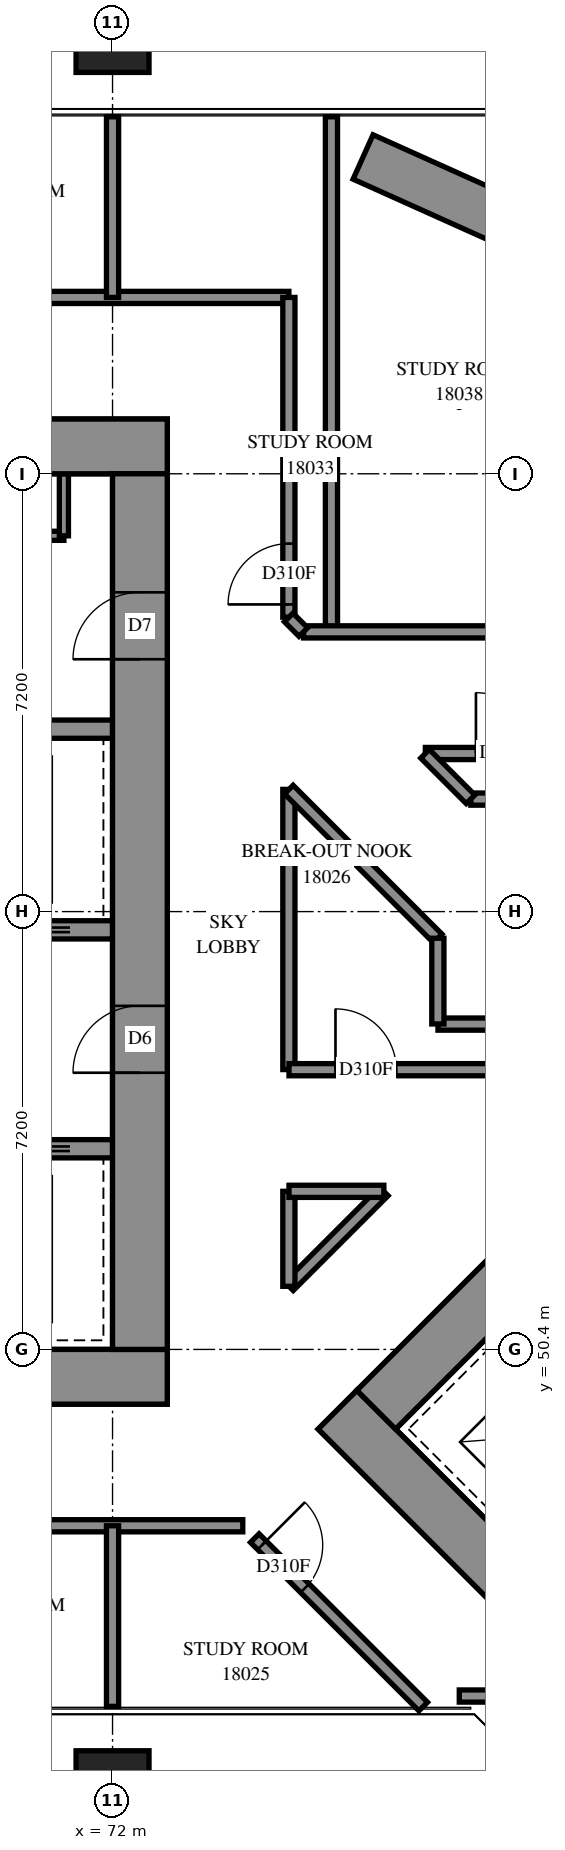
"""IFC4 building model, lengths in metres.
Left out: names, types, materials, properties, quantities, classifications, styles, units other than length and angle.
Written with IfcOpenShell. Run it as: python <this file> out.ifc"""

import sys

from ifc_helpers import new_model, si_unit, direction, frame, frame_2d, origin, origin_2d, place, context, subcontext, project, spatial, rectangle, extrude, element, fill, save


model = new_model("IFC4")
c1 = context("Model", 3, precision=1e-05, world=origin(), true_north=direction((0.0, 1.0)))
c2 = subcontext(c1, "Body", "Model", "MODEL_VIEW")
j1 = project(units=[si_unit("LENGTHUNIT", "METRE"), si_unit("PLANEANGLEUNIT", "RADIAN")], contexts=[c1])
p1 = place(None, origin())
s1 = spatial("IfcSite", under=j1, at=p1, CompositionType="ELEMENT")
p2 = place(p1, origin())
s2 = spatial("IfcBuilding", under=s1, at=p2, CompositionType="ELEMENT")
p3 = place(p2, frame((0.0, 0.0, 67.8)))
s3 = spatial("IfcBuildingStorey", under=s2, at=p3, CompositionType="ELEMENT", Elevation=67.8)
for number, where, z_axis, x_axis in (
    (1, (72.0, 43.2, 0.0), (0.0, 0.0, 1.0), (1.0, 0.0, 0.0)),
    (2, (72.0, 72.0, 0.0), (0.0, 0.0, 1.0), (1.0, 0.0, 0.0)),
):
    element("IfcColumn", number, at=place(p3, frame(where, z_axis=z_axis, x_axis=x_axis)), inside=s3, PredefinedType="COLUMN", context=c2, shape_type="SweptSolid", body=[
        extrude(rectangle(XDim=1.2, YDim=1.2, at=origin_2d()), origin(), (0.0, 0.0, 1.0), 3.9),
    ])
p4 = place(p3, frame((56.7, 49.95, -0.3), z_axis=(0.0, 0.0, 1.0), x_axis=(1.0, 0.0, 0.0)))
e3 = element("IfcWall", 3, at=p4, inside=s3, PredefinedType="SHEAR", context=c2, shape_type="SweptSolid", body=[
    extrude(rectangle(XDim=16.2, YDim=0.9, at=frame_2d((8.1, 0.0))), origin(), (0.0, 0.0, 1.0), 3.5),
])
p5 = place(p3, frame((56.7, 65.25, -0.3), z_axis=(0.0, 0.0, 1.0), x_axis=(1.0, 0.0, 0.0)))
e4 = element("IfcWall", 4, at=p5, inside=s3, PredefinedType="SHEAR", context=c2, shape_type="SweptSolid", body=[
    extrude(rectangle(XDim=16.2, YDim=0.9, at=frame_2d((8.1, 0.0))), origin(), (0.0, 0.0, 1.0), 3.5),
])
p6 = place(p5, frame((10.9, 0.0, 0.3)))
e5 = element("IfcOpeningElement", 5, at=p6, cuts=e4, PredefinedType="OPENING", context=c2, shape_type="SweptSolid", body=[
    extrude(rectangle(XDim=0.8, YDim=2.1, at=frame_2d((0.4, 1.05))), frame((0.0, 0.46, 0.0), z_axis=(0.0, -1.0, 0.0), x_axis=(1.0, 0.0, 0.0)), (0.0, 0.0, 1.0), 0.92),
])
p7 = place(p3, frame((72.45, 50.4, -0.3), z_axis=(0.0, 0.0, 1.0), x_axis=(0.0, 1.0, 0.0)))
e6 = element("IfcWall", 6, at=p7, inside=s3, PredefinedType="SHEAR", context=c2, shape_type="SweptSolid", body=[
    extrude(rectangle(XDim=14.4, YDim=0.9, at=frame_2d((7.2, 0.0))), origin(), (0.0, 0.0, 1.0), 3.5),
])
p8 = place(p7, frame((4.55, 0.0, 0.3)))
e7 = element("IfcOpeningElement", 7, at=p8, cuts=e6, PredefinedType="OPENING", context=c2, shape_type="SweptSolid", body=[
    extrude(rectangle(XDim=1.1, YDim=2.1, at=frame_2d((0.55, 1.05))), frame((0.0, 0.46, 0.0), z_axis=(0.0, -1.0, 0.0), x_axis=(1.0, 0.0, 0.0)), (0.0, 0.0, 1.0), 0.92),
])
p9 = place(p7, frame((11.35, 0.0, 0.3)))
e8 = element("IfcOpeningElement", 8, at=p9, cuts=e6, PredefinedType="OPENING", context=c2, shape_type="SweptSolid", body=[
    extrude(rectangle(XDim=1.1, YDim=2.1, at=frame_2d((0.55, 1.05))), frame((0.0, 0.46, 0.0), z_axis=(0.0, -1.0, 0.0), x_axis=(1.0, 0.0, 0.0)), (0.0, 0.0, 1.0), 0.92),
])
p10 = place(p3, frame((57.6, 53.7, 0.0), z_axis=(0.0, 0.0, 1.0), x_axis=(1.0, 0.0, 0.0)))
e9 = element("IfcWall", 9, at=p10, inside=s3, PredefinedType="SOLIDWALL", context=c2, shape_type="SweptSolid", body=[
    extrude(rectangle(XDim=14.4, YDim=0.3, at=frame_2d((7.2, 0.0))), origin(), (0.0, 0.0, 1.0), 3.9),
])
p11 = place(p10, frame((1.25, 0.0, 0.0)))
e10 = element("IfcOpeningElement", 10, at=p11, cuts=e9, PredefinedType="OPENING", context=c2, shape_type="SweptSolid", body=[
    extrude(rectangle(XDim=1.1, YDim=2.1, at=frame_2d((0.55, 1.05))), frame((0.0, 0.16, 0.0), z_axis=(0.0, -1.0, 0.0), x_axis=(1.0, 0.0, 0.0)), (0.0, 0.0, 1.0), 0.32),
])
p12 = place(p10, frame((4.85, 0.0, 0.0)))
e11 = element("IfcOpeningElement", 11, at=p12, cuts=e9, PredefinedType="OPENING", context=c2, shape_type="SweptSolid", body=[
    extrude(rectangle(XDim=1.1, YDim=2.1, at=frame_2d((0.55, 1.05))), frame((0.0, 0.16, 0.0), z_axis=(0.0, -1.0, 0.0), x_axis=(1.0, 0.0, 0.0)), (0.0, 0.0, 1.0), 0.32),
])
p13 = place(p10, frame((8.45, 0.0, 0.0)))
e12 = element("IfcOpeningElement", 12, at=p13, cuts=e9, PredefinedType="OPENING", context=c2, shape_type="SweptSolid", body=[
    extrude(rectangle(XDim=1.1, YDim=2.1, at=frame_2d((0.55, 1.05))), frame((0.0, 0.16, 0.0), z_axis=(0.0, -1.0, 0.0), x_axis=(1.0, 0.0, 0.0)), (0.0, 0.0, 1.0), 0.32),
])
p14 = place(p10, frame((12.05, 0.0, 0.0)))
e13 = element("IfcOpeningElement", 13, at=p14, cuts=e9, PredefinedType="OPENING", context=c2, shape_type="SweptSolid", body=[
    extrude(rectangle(XDim=1.1, YDim=2.1, at=frame_2d((0.55, 1.05))), frame((0.0, 0.16, 0.0), z_axis=(0.0, -1.0, 0.0), x_axis=(1.0, 0.0, 0.0)), (0.0, 0.0, 1.0), 0.32),
])
p15 = place(p3, frame((57.6, 57.3, 0.0), z_axis=(0.0, 0.0, 1.0), x_axis=(1.0, 0.0, 0.0)))
e14 = element("IfcWall", 14, at=p15, inside=s3, PredefinedType="SOLIDWALL", context=c2, shape_type="SweptSolid", body=[
    extrude(rectangle(XDim=14.4, YDim=0.3, at=frame_2d((7.2, 0.0))), origin(), (0.0, 0.0, 1.0), 3.9),
])
p16 = place(p15, frame((12.05, 0.0, 0.0)))
e15 = element("IfcOpeningElement", 15, at=p16, cuts=e14, PredefinedType="OPENING", context=c2, shape_type="SweptSolid", body=[
    extrude(rectangle(XDim=1.1, YDim=2.1, at=frame_2d((0.55, 1.05))), frame((0.0, 0.16, 0.0), z_axis=(0.0, -1.0, 0.0), x_axis=(1.0, 0.0, 0.0)), (0.0, 0.0, 1.0), 0.32),
])
p17 = place(p3, frame((64.8, 60.6, 0.0), z_axis=(0.0, 0.0, 1.0), x_axis=(1.0, 0.0, 0.0)))
e16 = element("IfcWall", 16, at=p17, inside=s3, PredefinedType="SOLIDWALL", context=c2, shape_type="SweptSolid", body=[
    extrude(rectangle(XDim=7.2, YDim=0.3, at=frame_2d((3.6, 0.0))), origin(), (0.0, 0.0, 1.0), 3.9),
])
p18 = place(p3, frame((75.7, 49.408, -0.3), z_axis=(0.0, 0.0, 1.0), x_axis=(0.7071098676, -0.7071036948, 0.0)))
e17 = element("IfcWall", 17, at=p18, inside=s3, PredefinedType="SHEAR", context=c2, shape_type="SweptSolid", body=[
    extrude(rectangle(XDim=16.2, YDim=0.9, at=frame_2d((8.1, 0.0))), origin(), (0.0, 0.0, 1.0), 3.5),
])
p19 = place(p3, frame((76.336, 49.408, -0.3), z_axis=(0.0, 0.0, 1.0), x_axis=(0.7071067812, 0.7071067812, 0.0)))
e18 = element("IfcWall", 18, at=p19, inside=s3, PredefinedType="SHEAR", context=c2, shape_type="SweptSolid", body=[
    extrude(rectangle(XDim=14.4, YDim=0.9, at=frame_2d((7.2, 0.0))), origin(), (0.0, 0.0, 1.0), 3.5),
])
p20 = place(p19, frame((4.55, 0.0, 0.3)))
e19 = element("IfcOpeningElement", 19, at=p20, cuts=e18, PredefinedType="OPENING", context=c2, shape_type="SweptSolid", body=[
    extrude(rectangle(XDim=1.1, YDim=2.1, at=frame_2d((0.55, 1.05))), frame((0.0, 0.46, 0.0), z_axis=(0.0, -1.0, 0.0), x_axis=(1.0, 0.0, 0.0)), (0.0, 0.0, 1.0), 0.92),
])
p21 = place(p19, frame((11.35, 0.0, 0.3)))
e20 = element("IfcOpeningElement", 20, at=p21, cuts=e18, PredefinedType="OPENING", context=c2, shape_type="SweptSolid", body=[
    extrude(rectangle(XDim=1.1, YDim=2.1, at=frame_2d((0.55, 1.05))), frame((0.0, 0.46, 0.0), z_axis=(0.0, -1.0, 0.0), x_axis=(1.0, 0.0, 0.0)), (0.0, 0.0, 1.0), 0.92),
])
p22 = place(p3, frame((79.28, 68.59, 0.0), z_axis=(0.0, 0.0, 1.0), x_axis=(-0.9121050399, 0.4099565785, 0.0)))
e21 = element("IfcWall", 21, at=p22, inside=s3, PredefinedType="SOLIDWALL", context=c2, shape_type="SweptSolid", body=[
    extrude(rectangle(XDim=3.465, YDim=0.8, at=frame_2d((1.732, 0.0))), origin(), (0.0, 0.0, 1.0), 0.65),
])
p23 = place(p3, frame((64.95, 63.78, 0.0), z_axis=(0.0, 0.0, 1.0), x_axis=(1.0, 0.0, 0.0)))
e22 = element("IfcWall", 22, at=p23, inside=s3, PredefinedType="PARTITIONING", context=c2, shape_type="SweptSolid", body=[
    extrude(rectangle(XDim=6.25, YDim=0.15, at=frame_2d((3.125, 0.0))), origin(), (0.0, 0.0, 1.0), 3.9),
])
p24 = place(p3, frame((71.2, 63.78, 0.0), z_axis=(0.0, 0.0, 1.0), x_axis=(0.0, 1.0, 0.0)))
e23 = element("IfcWall", 23, at=p24, inside=s3, PredefinedType="PARTITIONING", context=c2, shape_type="SweptSolid", body=[
    extrude(rectangle(XDim=1.02, YDim=0.15, at=frame_2d((0.51, 0.0))), origin(), (0.0, 0.0, 1.0), 3.9),
])
p25 = place(p3, frame((54.7, 67.7, 0.0), z_axis=(0.0, 0.0, 1.0), x_axis=(1.0, 0.0, 0.0)))
e24 = element("IfcWall", 24, at=p25, inside=s3, PredefinedType="PARTITIONING", context=c2, shape_type="SweptSolid", body=[
    extrude(rectangle(XDim=20.2, YDim=0.2, at=frame_2d((10.1, 0.0))), origin(), (0.0, 0.0, 1.0), 3.9),
])
p26 = place(p25, frame((4.992, 0.0, 0.0)))
e25 = element("IfcOpeningElement", 25, at=p26, cuts=e24, PredefinedType="OPENING", context=c2, shape_type="SweptSolid", body=[
    extrude(rectangle(XDim=1.0, YDim=2.1, at=frame_2d((0.5, 1.05))), frame((0.0, 0.11, 0.0), z_axis=(0.0, -1.0, 0.0), x_axis=(1.0, 0.0, 0.0)), (0.0, 0.0, 1.0), 0.22),
])
p27 = place(p25, frame((7.067, 0.0, 0.0)))
e26 = element("IfcOpeningElement", 26, at=p27, cuts=e24, PredefinedType="OPENING", context=c2, shape_type="SweptSolid", body=[
    extrude(rectangle(XDim=1.0, YDim=2.1, at=frame_2d((0.5, 1.05))), frame((0.0, 0.11, 0.0), z_axis=(0.0, -1.0, 0.0), x_axis=(1.0, 0.0, 0.0)), (0.0, 0.0, 1.0), 0.22),
])
p28 = place(p25, frame((12.193, 0.0, 0.0)))
e27 = element("IfcOpeningElement", 27, at=p28, cuts=e24, PredefinedType="OPENING", context=c2, shape_type="SweptSolid", body=[
    extrude(rectangle(XDim=1.0, YDim=2.1, at=frame_2d((0.5, 1.05))), frame((0.0, 0.11, 0.0), z_axis=(0.0, -1.0, 0.0), x_axis=(1.0, 0.0, 0.0)), (0.0, 0.0, 1.0), 0.22),
])
p29 = place(p25, frame((14.268, 0.0, 0.0)))
e28 = element("IfcOpeningElement", 28, at=p29, cuts=e24, PredefinedType="OPENING", context=c2, shape_type="SweptSolid", body=[
    extrude(rectangle(XDim=1.0, YDim=2.1, at=frame_2d((0.5, 1.05))), frame((0.0, 0.11, 0.0), z_axis=(0.0, -1.0, 0.0), x_axis=(1.0, 0.0, 0.0)), (0.0, 0.0, 1.0), 0.22),
])
p30 = place(p3, frame((54.7, 47.5, 0.0), z_axis=(0.0, 0.0, 1.0), x_axis=(1.0, 0.0, 0.0)))
e29 = element("IfcWall", 29, at=p30, inside=s3, PredefinedType="PARTITIONING", context=c2, shape_type="SweptSolid", body=[
    extrude(rectangle(XDim=19.442, YDim=0.2, at=frame_2d((9.721, 0.0))), origin(), (0.0, 0.0, 1.0), 3.9),
])
p31 = place(p30, frame((4.933, 0.0, 0.0)))
e30 = element("IfcOpeningElement", 30, at=p31, cuts=e29, PredefinedType="OPENING", context=c2, shape_type="SweptSolid", body=[
    extrude(rectangle(XDim=1.0, YDim=2.1, at=frame_2d((0.5, 1.05))), frame((0.0, 0.11, 0.0), z_axis=(0.0, -1.0, 0.0), x_axis=(1.0, 0.0, 0.0)), (0.0, 0.0, 1.0), 0.22),
])
p32 = place(p30, frame((7.008, 0.0, 0.0)))
e31 = element("IfcOpeningElement", 31, at=p32, cuts=e29, PredefinedType="OPENING", context=c2, shape_type="SweptSolid", body=[
    extrude(rectangle(XDim=1.0, YDim=2.1, at=frame_2d((0.5, 1.05))), frame((0.0, 0.11, 0.0), z_axis=(0.0, -1.0, 0.0), x_axis=(1.0, 0.0, 0.0)), (0.0, 0.0, 1.0), 0.22),
])
p33 = place(p30, frame((12.133, 0.0, 0.0)))
e32 = element("IfcOpeningElement", 32, at=p33, cuts=e29, PredefinedType="OPENING", context=c2, shape_type="SweptSolid", body=[
    extrude(rectangle(XDim=1.0, YDim=2.1, at=frame_2d((0.5, 1.05))), frame((0.0, 0.11, 0.0), z_axis=(0.0, -1.0, 0.0), x_axis=(1.0, 0.0, 0.0)), (0.0, 0.0, 1.0), 0.22),
])
p34 = place(p30, frame((14.207, 0.0, 0.0)))
e33 = element("IfcOpeningElement", 33, at=p34, cuts=e29, PredefinedType="OPENING", context=c2, shape_type="SweptSolid", body=[
    extrude(rectangle(XDim=1.0, YDim=2.1, at=frame_2d((0.5, 1.05))), frame((0.0, 0.11, 0.0), z_axis=(0.0, -1.0, 0.0), x_axis=(1.0, 0.0, 0.0)), (0.0, 0.0, 1.0), 0.22),
])
p35 = place(p3, frame((75.6, 62.2, 0.0), z_axis=(0.0, 0.0, 1.0), x_axis=(0.0, 1.0, 0.0)))
e34 = element("IfcWall", 34, at=p35, inside=s3, PredefinedType="PARTITIONING", context=c2, shape_type="SweptSolid", body=[
    extrude(rectangle(XDim=8.47, YDim=0.2, at=frame_2d((4.235, 0.0))), origin(), (0.0, 0.0, 1.0), 3.9),
])
p36 = place(p3, frame((74.9, 62.442, 0.0), z_axis=(0.0, 0.0, 1.0), x_axis=(0.0, 1.0, 0.0)))
e35 = element("IfcWall", 35, at=p36, inside=s3, PredefinedType="PARTITIONING", context=c2, shape_type="SweptSolid", body=[
    extrude(rectangle(XDim=5.258, YDim=0.2, at=frame_2d((2.629, 0.0))), origin(), (0.0, 0.0, 1.0), 3.9),
])
p37 = place(p36, frame((0.209, 0.0, 0.0)))
e36 = element("IfcOpeningElement", 36, at=p37, cuts=e35, PredefinedType="OPENING", context=c2, shape_type="SweptSolid", body=[
    extrude(rectangle(XDim=1.0, YDim=2.1, at=frame_2d((0.5, 1.05))), frame((0.0, 0.11, 0.0), z_axis=(0.0, -1.0, 0.0), x_axis=(1.0, 0.0, 0.0)), (0.0, 0.0, 1.0), 0.22),
])
p38 = place(p3, frame((74.9, 55.002, 0.0), z_axis=(0.0, 0.0, 1.0), x_axis=(0.0, 1.0, 0.0)))
e37 = element("IfcWall", 37, at=p38, inside=s3, PredefinedType="PARTITIONING", context=c2, shape_type="SweptSolid", body=[
    extrude(rectangle(XDim=4.608, YDim=0.2, at=frame_2d((2.304, 0.0))), origin(), (0.0, 0.0, 1.0), 3.9),
])
p39 = place(p3, frame((75.142, 62.2, 0.0), z_axis=(0.0, 0.0, 1.0), x_axis=(1.0, 0.0, 0.0)))
e38 = element("IfcWall", 38, at=p39, inside=s3, PredefinedType="PARTITIONING", context=c2, shape_type="SweptSolid", body=[
    extrude(rectangle(XDim=4.058, YDim=0.2, at=frame_2d((2.029, 0.0))), origin(), (0.0, 0.0, 1.0), 3.9),
])
p40 = place(p3, frame((74.339, 47.297, 0.0), z_axis=(0.0, 0.0, 1.0), x_axis=(0.7071067812, -0.7071067812, 0.0)))
e39 = element("IfcWall", 39, at=p40, inside=s3, PredefinedType="PARTITIONING", context=c2, shape_type="SweptSolid", body=[
    extrude(rectangle(XDim=3.917, YDim=0.2, at=frame_2d((1.959, 0.0))), origin(), (0.0, 0.0, 1.0), 3.9),
])
p41 = place(p40, frame((0.165, 0.0, 0.0)))
e40 = element("IfcOpeningElement", 40, at=p41, cuts=e39, PredefinedType="OPENING", context=c2, shape_type="SweptSolid", body=[
    extrude(rectangle(XDim=1.0, YDim=2.1, at=frame_2d((0.5, 1.05))), frame((0.0, 0.11, 0.0), z_axis=(0.0, -1.0, 0.0), x_axis=(1.0, 0.0, 0.0)), (0.0, 0.0, 1.0), 0.22),
])
p42 = place(p3, frame((74.902, 55.0, 0.0), z_axis=(0.0, 0.0, 1.0), x_axis=(1.0, 0.0, 0.0)))
e41 = element("IfcWall", 41, at=p42, inside=s3, PredefinedType="PARTITIONING", context=c2, shape_type="SweptSolid", body=[
    extrude(rectangle(XDim=3.562, YDim=0.2, at=frame_2d((1.781, 0.0))), origin(), (0.0, 0.0, 1.0), 3.9),
])
p43 = place(p42, frame((0.764, 0.0, 0.0)))
e42 = element("IfcOpeningElement", 42, at=p43, cuts=e41, PredefinedType="OPENING", context=c2, shape_type="SweptSolid", body=[
    extrude(rectangle(XDim=1.0, YDim=2.1, at=frame_2d((0.5, 1.05))), frame((0.0, 0.11, 0.0), z_axis=(0.0, -1.0, 0.0), x_axis=(1.0, 0.0, 0.0)), (0.0, 0.0, 1.0), 0.22),
])
p44 = place(p3, frame((74.899, 59.607, 0.0), z_axis=(0.0, 0.0, 1.0), x_axis=(0.7071067812, -0.7071067812, 0.0)))
e43 = element("IfcWall", 43, at=p44, inside=s3, PredefinedType="PARTITIONING", context=c2, shape_type="SweptSolid", body=[
    extrude(rectangle(XDim=3.462, YDim=0.2, at=frame_2d((1.731, 0.0))), origin(), (0.0, 0.0, 1.0), 3.9),
])
for number, where, z_axis, x_axis in (
    (44, (72.0, 44.53, 0.0), (0.0, 0.0, 1.0), (0.0, 1.0, 0.0)),
    (45, (72.0, 67.7, 0.0), (0.0, 0.0, 1.0), (0.0, 1.0, 0.0)),
):
    element("IfcWall", number, at=place(p3, frame(where, z_axis=z_axis, x_axis=x_axis)), inside=s3, PredefinedType="PARTITIONING", context=c2, shape_type="SweptSolid", body=[
        extrude(rectangle(XDim=2.97, YDim=0.2, at=frame_2d((1.485, 0.0))), origin(), (0.0, 0.0, 1.0), 3.9),
    ])
p45 = place(p3, frame((74.901, 51.439, 0.0), z_axis=(0.0, 0.0, 1.0), x_axis=(0.7071067812, 0.7071067812, 0.0)))
e46 = element("IfcWall", 46, at=p45, inside=s3, PredefinedType="PARTITIONING", context=c2, shape_type="SweptSolid", body=[
    extrude(rectangle(XDim=2.206, YDim=0.2, at=frame_2d((1.103, 0.0))), origin(), (0.0, 0.0, 1.0), 3.9),
])
p46 = place(p3, frame((77.144, 60.2, 0.0), z_axis=(0.0, 0.0, 1.0), x_axis=(1.0, 0.0, 0.0)))
e47 = element("IfcWall", 47, at=p46, inside=s3, PredefinedType="PARTITIONING", context=c2, shape_type="SweptSolid", body=[
    extrude(rectangle(XDim=2.054, YDim=0.2, at=frame_2d((1.027, 0.0))), origin(), (0.0, 0.0, 1.0), 3.9),
])
p47 = place(p46, frame((0.832, 0.0, 0.0)))
e48 = element("IfcOpeningElement", 48, at=p47, cuts=e47, PredefinedType="OPENING", context=c2, shape_type="SweptSolid", body=[
    extrude(rectangle(XDim=1.0, YDim=2.1, at=frame_2d((0.5, 1.05))), frame((0.0, 0.11, 0.0), z_axis=(0.0, -1.0, 0.0), x_axis=(1.0, 0.0, 0.0)), (0.0, 0.0, 1.0), 0.22),
])
p48 = place(p3, frame((77.702, 44.7, 0.0), z_axis=(0.0, 0.0, 1.0), x_axis=(1.0, 0.0, 0.0)))
e49 = element("IfcWall", 49, at=p48, inside=s3, PredefinedType="PARTITIONING", context=c2, shape_type="SweptSolid", body=[
    extrude(rectangle(XDim=1.956, YDim=0.2, at=frame_2d((0.978, 0.0))), origin(), (0.0, 0.0, 1.0), 3.9),
])
p49 = place(p3, frame((77.892, 59.45, 0.0), z_axis=(0.0, 0.0, 1.0), x_axis=(1.0, 0.0, 0.0)))
e50 = element("IfcWall", 50, at=p49, inside=s3, PredefinedType="PARTITIONING", context=c2, shape_type="SweptSolid", body=[
    extrude(rectangle(XDim=1.908, YDim=0.2, at=frame_2d((0.954, 0.0))), origin(), (0.0, 0.0, 1.0), 3.9),
])
p50 = place(p3, frame((74.9, 51.438, 0.0), z_axis=(0.0, 0.0, 1.0), x_axis=(0.0, 1.0, 0.0)))
e51 = element("IfcWall", 51, at=p50, inside=s3, PredefinedType="PARTITIONING", context=c2, shape_type="SweptSolid", body=[
    extrude(rectangle(XDim=1.562, YDim=0.2, at=frame_2d((0.781, 0.0))), origin(), (0.0, 0.0, 1.0), 3.9),
])
p51 = place(p3, frame((74.902, 53.0, 0.0), z_axis=(0.0, 0.0, 1.0), x_axis=(1.0, 0.0, 0.0)))
e52 = element("IfcWall", 52, at=p51, inside=s3, PredefinedType="PARTITIONING", context=c2, shape_type="SweptSolid", body=[
    extrude(rectangle(XDim=1.56, YDim=0.2, at=frame_2d((0.78, 0.0))), origin(), (0.0, 0.0, 1.0), 3.9),
])
for number, where, z_axis, x_axis in (
    (53, (77.352, 55.75, 0.0), (0.0, 0.0, 1.0), (1.0, 0.0, 0.0)),
    (54, (77.35, 55.752, 0.0), (0.0, 0.0, 1.0), (0.0, 1.0, 0.0)),
):
    element("IfcWall", number, at=place(p3, frame(where, z_axis=z_axis, x_axis=x_axis)), inside=s3, PredefinedType="PARTITIONING", context=c2, shape_type="SweptSolid", body=[
        extrude(rectangle(XDim=1.41, YDim=0.2, at=frame_2d((0.705, 0.0))), origin(), (0.0, 0.0, 1.0), 3.9),
    ])
p52 = place(p3, frame((77.139, 60.195, 0.0), z_axis=(0.0, 0.0, 1.0), x_axis=(0.7071067812, -0.7071067812, 0.0)))
e55 = element("IfcWall", 55, at=p52, inside=s3, PredefinedType="PARTITIONING", context=c2, shape_type="SweptSolid", body=[
    extrude(rectangle(XDim=1.058, YDim=0.2, at=frame_2d((0.529, 0.0))), origin(), (0.0, 0.0, 1.0), 3.9),
])
p53 = place(p3, frame((74.897, 62.437, 0.0), z_axis=(0.0, 0.0, 1.0), x_axis=(0.7071067812, -0.7071067812, 0.0)))
e56 = element("IfcWall", 56, at=p53, inside=s3, PredefinedType="PARTITIONING", context=c2, shape_type="SweptSolid", body=[
    extrude(rectangle(XDim=0.339, YDim=0.2, at=frame_2d((0.17, 0.0))), origin(), (0.0, 0.0, 1.0), 3.9),
])
p54 = place(p8, origin())
e57 = element("IfcDoor", 57, at=p54, inside=s3, OperationType="DOUBLE_DOOR_SINGLE_SWING", PredefinedType="DOOR", context=c2, shape_type="SweptSolid", body=[
    extrude(rectangle(XDim=1.1, YDim=2.1, at=frame_2d((0.55, 1.05))), frame((0.0, 0.025, 0.0), z_axis=(0.0, -1.0, 0.0), x_axis=(1.0, 0.0, 0.0)), (0.0, 0.0, 1.0), 0.05),
])
fill(e7, e57)
p55 = place(p9, origin())
e58 = element("IfcDoor", 58, at=p55, inside=s3, OperationType="SINGLE_SWING_RIGHT", PredefinedType="DOOR", context=c2, shape_type="SweptSolid", body=[
    extrude(rectangle(XDim=1.1, YDim=2.1, at=frame_2d((0.55, 1.05))), frame((0.0, 0.025, 0.0), z_axis=(0.0, -1.0, 0.0), x_axis=(1.0, 0.0, 0.0)), (0.0, 0.0, 1.0), 0.05),
])
fill(e8, e58)
p56 = place(p41, origin())
e59 = element("IfcDoor", 59, at=p56, inside=s3, OperationType="SINGLE_SWING_LEFT", PredefinedType="DOOR", context=c2, shape_type="SweptSolid", body=[
    extrude(rectangle(XDim=1.0, YDim=2.1, at=frame_2d((0.5, 1.05))), frame((0.0, 0.025, 0.0), z_axis=(0.0, -1.0, 0.0), x_axis=(1.0, 0.0, 0.0)), (0.0, 0.0, 1.0), 0.05),
])
fill(e40, e59)
p57 = place(p43, origin())
e60 = element("IfcDoor", 60, at=p57, inside=s3, OperationType="SINGLE_SWING_LEFT", PredefinedType="DOOR", context=c2, shape_type="SweptSolid", body=[
    extrude(rectangle(XDim=1.0, YDim=2.1, at=frame_2d((0.5, 1.05))), frame((0.0, 0.025, 0.0), z_axis=(0.0, -1.0, 0.0), x_axis=(1.0, 0.0, 0.0)), (0.0, 0.0, 1.0), 0.05),
])
fill(e42, e60)
p58 = place(p37, origin())
e61 = element("IfcDoor", 61, at=p58, inside=s3, OperationType="SINGLE_SWING_RIGHT", PredefinedType="DOOR", context=c2, shape_type="SweptSolid", body=[
    extrude(rectangle(XDim=1.0, YDim=2.1, at=frame_2d((0.5, 1.05))), frame((0.0, 0.025, 0.0), z_axis=(0.0, -1.0, 0.0), x_axis=(1.0, 0.0, 0.0)), (0.0, 0.0, 1.0), 0.05),
])
fill(e36, e61)
p59 = place(p47, origin())
e62 = element("IfcDoor", 62, at=p59, inside=s3, OperationType="SINGLE_SWING_LEFT", PredefinedType="DOOR", context=c2, shape_type="SweptSolid", body=[
    extrude(rectangle(XDim=1.0, YDim=2.1, at=frame_2d((0.5, 1.05))), frame((0.0, 0.025, 0.0), z_axis=(0.0, -1.0, 0.0), x_axis=(1.0, 0.0, 0.0)), (0.0, 0.0, 1.0), 0.05),
])
fill(e48, e62)
save(model, sys.argv[1])
